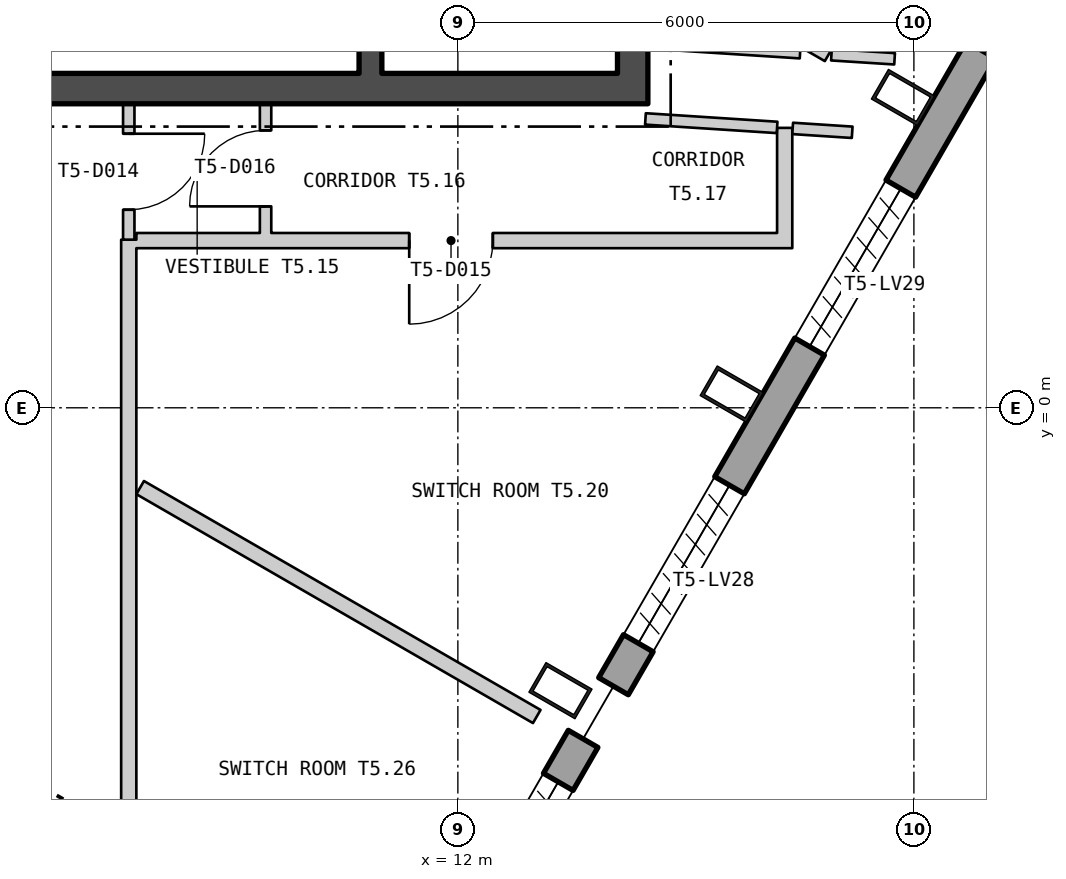
"""IFC4 building model, lengths in metres.
Left out: names, types, materials, properties, quantities, classifications, styles, units other than length and angle.
Written with IfcOpenShell. Run it as: python <this file> out.ifc"""

import sys

from ifc_helpers import new_model, si_unit, direction, frame, frame_2d, origin, origin_2d, place, context, subcontext, project, spatial, polyline, rectangle, hollow_rectangle, outline, extrude, element, fill, save


model = new_model("IFC4")
c1 = context("Model", 3, precision=1e-05, world=origin(), true_north=direction((0.0, 1.0)))
c2 = subcontext(c1, "Body", "Model", "MODEL_VIEW")
j1 = project(units=[si_unit("LENGTHUNIT", "METRE"), si_unit("PLANEANGLEUNIT", "RADIAN")], contexts=[c1])
p1 = place(None, origin())
s1 = spatial("IfcSite", under=j1, at=p1, CompositionType="ELEMENT")
p2 = place(p1, origin())
s2 = spatial("IfcBuilding", under=s1, at=p2, CompositionType="ELEMENT")
p3 = place(p2, frame((0.0, 0.0, 292.2)))
s3 = spatial("IfcBuildingStorey", under=s2, at=p3, CompositionType="ELEMENT", Elevation=292.2)
for number, where, z_axis, x_axis in (
    (1, (13.35, -3.722, 0.0), (0.0, 0.0, 1.0), (0.5, 0.866, 0.0)),
    (2, (15.603, 0.181, 0.0), (0.0, 0.0, 1.0), (0.5, 0.866, 0.0)),
    (3, (17.856, 4.083, 0.0), (0.0, 0.0, 1.0), (0.5, 0.866, 0.0)),
):
    element("IfcColumn", number, at=place(p3, frame(where, z_axis=z_axis, x_axis=x_axis)), inside=s3, PredefinedType="COLUMN", context=c2, shape_type="SweptSolid", body=[
        extrude(hollow_rectangle(XDim=0.45, YDim=0.7, WallThickness=0.04, at=origin_2d()), origin(), (0.0, 0.0, 1.0), 6.0),
    ])
p4 = place(p3, frame((11.794, -7.566, -0.18), z_axis=(0.0, 0.0, 1.0), x_axis=(0.50000114038, 0.866024745385, 0.0)))
e4 = element("IfcWall", 4, at=p4, inside=s3, PredefinedType="SOLIDWALL", context=c2, shape_type="SweptSolid", body=[
    extrude(outline(polyline([(0.0, -0.225), (3.707, -0.225), (3.707, 0.225), (0.0, 0.225), (0.0, -0.225)])), origin(), (0.0, 0.0, 1.0), 5.9),
])
p5 = place(p4, frame((0.653, 0.0, 1.38)))
e5 = element("IfcOpeningElement", 5, at=p5, cuts=e4, PredefinedType="OPENING", context=c2, shape_type="SweptSolid", body=[
    extrude(rectangle(XDim=2.4, YDim=3.6, at=frame_2d((1.2, 1.8))), frame((0.0, 0.235, 0.0), z_axis=(0.0, -1.0, 0.0), x_axis=(1.0, 0.0, 0.0)), (0.0, 0.0, 1.0), 0.47),
])
p6 = place(p3, frame((14.048, -3.663, -0.18), z_axis=(0.0, 0.0, 1.0), x_axis=(0.500002580931, 0.866023913678, 0.0)))
e6 = element("IfcWall", 6, at=p6, inside=s3, PredefinedType="SOLIDWALL", context=c2, shape_type="SweptSolid", body=[
    extrude(outline(polyline([(0.0, -0.225), (22.595, -0.225), (22.335, 0.225), (0.0, 0.225), (0.0, -0.225)])), origin(), (0.0, 0.0, 1.0), 5.9),
])
p7 = place(p6, frame((0.653, 0.0, 1.38)))
e7 = element("IfcOpeningElement", 7, at=p7, cuts=e6, PredefinedType="OPENING", context=c2, shape_type="SweptSolid", body=[
    extrude(rectangle(XDim=2.4, YDim=3.6, at=frame_2d((1.2, 1.8))), frame((0.0, 0.235, 0.0), z_axis=(0.0, -1.0, 0.0), x_axis=(1.0, 0.0, 0.0)), (0.0, 0.0, 1.0), 0.47),
])
p8 = place(p6, frame((5.16, 0.0, 1.38)))
e8 = element("IfcOpeningElement", 8, at=p8, cuts=e6, PredefinedType="OPENING", context=c2, shape_type="SweptSolid", body=[
    extrude(rectangle(XDim=2.4, YDim=3.6, at=frame_2d((1.2, 1.8))), frame((0.0, 0.235, 0.0), z_axis=(0.0, -1.0, 0.0), x_axis=(1.0, 0.0, 0.0)), (0.0, 0.0, 1.0), 0.47),
])
p9 = place(p6, frame((9.667, 0.0, 1.38)))
e9 = element("IfcOpeningElement", 9, at=p9, cuts=e6, PredefinedType="OPENING", context=c2, shape_type="SweptSolid", body=[
    extrude(rectangle(XDim=2.4, YDim=3.6, at=frame_2d((1.2, 1.8))), frame((0.0, 0.235, 0.0), z_axis=(0.0, -1.0, 0.0), x_axis=(1.0, 0.0, 0.0)), (0.0, 0.0, 1.0), 0.47),
])
p10 = place(p6, frame((14.173, 0.0, 1.38)))
e10 = element("IfcOpeningElement", 10, at=p10, cuts=e6, PredefinedType="OPENING", context=c2, shape_type="SweptSolid", body=[
    extrude(rectangle(XDim=2.4, YDim=3.6, at=frame_2d((1.2, 1.8))), frame((0.0, 0.235, 0.0), z_axis=(0.0, -1.0, 0.0), x_axis=(1.0, 0.0, 0.0)), (0.0, 0.0, 1.0), 0.47),
])
p11 = place(p6, frame((18.641, 0.0, 1.38)))
e11 = element("IfcOpeningElement", 11, at=p11, cuts=e6, PredefinedType="OPENING", context=c2, shape_type="SweptSolid", body=[
    extrude(rectangle(XDim=2.4, YDim=3.6, at=frame_2d((1.2, 1.8))), frame((0.0, 0.235, 0.0), z_axis=(0.0, -1.0, 0.0), x_axis=(1.0, 0.0, 0.0)), (0.0, 0.0, 1.0), 0.47),
])
p12 = place(p3, frame((-14.5, 4.2, 0.0), z_axis=(0.0, 0.0, 1.0), x_axis=(1.0, 0.0, 0.0)))
e12 = element("IfcWall", 12, at=p12, inside=s3, PredefinedType="SHEAR", context=c2, shape_type="SweptSolid", body=[
    extrude(rectangle(XDim=29.0, YDim=0.4, at=frame_2d((14.5, 0.0))), origin(), (0.0, 0.0, 1.0), 5.7),
])
p13 = place(p12, frame((9.0, 0.0, 0.0)))
e13 = element("IfcOpeningElement", 13, at=p13, cuts=e12, PredefinedType="OPENING", context=c2, shape_type="SweptSolid", body=[
    extrude(rectangle(XDim=1.8, YDim=2.4, at=frame_2d((0.9, 1.2))), frame((0.0, 0.21, 0.0), z_axis=(0.0, -1.0, 0.0), x_axis=(1.0, 0.0, 0.0)), (0.0, 0.0, 1.0), 0.42),
])
p14 = place(p12, frame((19.0, 0.0, 0.0)))
e14 = element("IfcOpeningElement", 14, at=p14, cuts=e12, PredefinedType="OPENING", context=c2, shape_type="SweptSolid", body=[
    extrude(rectangle(XDim=1.8, YDim=2.4, at=frame_2d((0.9, 1.2))), frame((0.0, 0.21, 0.0), z_axis=(0.0, -1.0, 0.0), x_axis=(1.0, 0.0, 0.0)), (0.0, 0.0, 1.0), 0.42),
])
p15 = place(p3, frame((14.3, 4.4, 0.0), z_axis=(0.0, 0.0, 1.0), x_axis=(0.0, 1.0, 0.0)))
e15 = element("IfcWall", 15, at=p15, inside=s3, PredefinedType="SHEAR", context=c2, shape_type="SweptSolid", body=[
    extrude(rectangle(XDim=13.2, YDim=0.4, at=frame_2d((6.6, 0.0))), origin(), (0.0, 0.0, 1.0), 5.7),
])
p16 = place(p15, frame((3.05, 0.0, 0.0)))
e16 = element("IfcOpeningElement", 16, at=p16, cuts=e15, PredefinedType="OPENING", context=c2, shape_type="SweptSolid", body=[
    extrude(rectangle(XDim=1.5, YDim=2.1, at=frame_2d((0.75, 1.05))), frame((0.0, 0.21, 0.0), z_axis=(0.0, -1.0, 0.0), x_axis=(1.0, 0.0, 0.0)), (0.0, 0.0, 1.0), 0.42),
])
p17 = place(p3, frame((10.85, 4.4, 0.0), z_axis=(0.0, 0.0, 1.0), x_axis=(0.0, 1.0, 0.0)))
e17 = element("IfcWall", 17, at=p17, inside=s3, PredefinedType="SHEAR", context=c2, shape_type="SweptSolid", body=[
    extrude(rectangle(XDim=13.2, YDim=0.3, at=frame_2d((6.6, 0.0))), origin(), (0.0, 0.0, 1.0), 5.7),
])
p18 = place(p17, frame((1.575, 0.0, 0.0)))
e18 = element("IfcOpeningElement", 18, at=p18, cuts=e17, PredefinedType="OPENING", context=c2, shape_type="SweptSolid", body=[
    extrude(rectangle(XDim=1.25, YDim=2.1, at=frame_2d((0.625, 1.05))), frame((0.0, 0.16, 0.0), z_axis=(0.0, -1.0, 0.0), x_axis=(1.0, 0.0, 0.0)), (0.0, 0.0, 1.0), 0.32),
])
p19 = place(p17, frame((0.4, 0.0, 0.0)))
e19 = element("IfcOpeningElement", 19, at=p19, cuts=e17, PredefinedType="OPENING", context=c2, shape_type="SweptSolid", body=[
    extrude(rectangle(XDim=0.9, YDim=2.1, at=frame_2d((0.45, 1.05))), frame((0.0, 0.16, 0.0), z_axis=(0.0, -1.0, 0.0), x_axis=(1.0, 0.0, 0.0)), (0.0, 0.0, 1.0), 0.32),
])
p20 = place(p3, frame((7.67, -13.7, 0.0), z_axis=(0.0, 0.0, 1.0), x_axis=(0.0, 1.0, 0.0)))
e20 = element("IfcWall", 20, at=p20, inside=s3, PredefinedType="PARTITIONING", context=c2, shape_type="SweptSolid", body=[
    extrude(rectangle(XDim=15.912, YDim=0.2, at=frame_2d((7.956, 0.0))), origin(), (0.0, 0.0, 1.0), 5.7),
])
p21 = place(p20, frame((5.342, 0.0, 0.0)))
e21 = element("IfcOpeningElement", 21, at=p21, cuts=e20, PredefinedType="OPENING", context=c2, shape_type="SweptSolid", body=[
    extrude(rectangle(XDim=1.1, YDim=2.1, at=frame_2d((0.55, 1.05))), frame((0.0, 0.11, 0.0), z_axis=(0.0, -1.0, 0.0), x_axis=(1.0, 0.0, 0.0)), (0.0, 0.0, 1.0), 0.22),
])
p22 = place(p3, frame((7.67, 2.212, 0.0), z_axis=(0.0, 0.0, 1.0), x_axis=(0.0, 1.0, 0.0)))
e22 = element("IfcWall", 22, at=p22, inside=s3, PredefinedType="PARTITIONING", context=c2, shape_type="SweptSolid", body=[
    extrude(rectangle(XDim=1.788, YDim=0.15, at=frame_2d((0.894, 0.0))), origin(), (0.0, 0.0, 1.0), 5.7),
])
p23 = place(p22, frame((0.394, 0.0, 0.0)))
e23 = element("IfcOpeningElement", 23, at=p23, cuts=e22, PredefinedType="OPENING", context=c2, shape_type="SweptSolid", body=[
    extrude(rectangle(XDim=1.0, YDim=2.1, at=frame_2d((0.5, 1.05))), frame((0.0, 0.085, 0.0), z_axis=(0.0, -1.0, 0.0), x_axis=(1.0, 0.0, 0.0)), (0.0, 0.0, 1.0), 0.17),
])
p24 = place(p3, frame((7.77, 2.2, 0.0), z_axis=(0.0, 0.0, 1.0), x_axis=(1.0, 0.0, 0.0)))
e24 = element("IfcWall", 24, at=p24, inside=s3, PredefinedType="PARTITIONING", context=c2, shape_type="SweptSolid", body=[
    extrude(rectangle(XDim=8.63, YDim=0.2, at=frame_2d((4.315, 0.0))), origin(), (0.0, 0.0, 1.0), 5.7),
])
p25 = place(p24, frame((3.59, 0.0, 0.0)))
e25 = element("IfcOpeningElement", 25, at=p25, cuts=e24, PredefinedType="OPENING", context=c2, shape_type="SweptSolid", body=[
    extrude(rectangle(XDim=1.1, YDim=2.1, at=frame_2d((0.55, 1.05))), frame((0.0, 0.11, 0.0), z_axis=(0.0, -1.0, 0.0), x_axis=(1.0, 0.0, 0.0)), (0.0, 0.0, 1.0), 0.22),
])
p26 = place(p3, frame((7.82, -1.05, 0.0), z_axis=(0.0, 0.0, 1.0), x_axis=(0.866069507536, -0.49992360228, 0.0)))
e26 = element("IfcWall", 26, at=p26, inside=s3, PredefinedType="PARTITIONING", context=c2, shape_type="SweptSolid", body=[
    extrude(rectangle(XDim=6.025, YDim=0.2, at=frame_2d((3.012, 0.0))), origin(), (0.0, 0.0, 1.0), 5.7),
])
p27 = place(p3, frame((9.47, 2.3, 0.0), z_axis=(0.0, 0.0, 1.0), x_axis=(0.0, 1.0, 0.0)))
e27 = element("IfcWall", 27, at=p27, inside=s3, PredefinedType="PARTITIONING", context=c2, shape_type="SweptSolid", body=[
    extrude(rectangle(XDim=1.7, YDim=0.15, at=frame_2d((0.85, 0.0))), origin(), (0.0, 0.0, 1.0), 5.25),
])
p28 = place(p27, frame((0.35, 0.0, 0.0)))
e28 = element("IfcOpeningElement", 28, at=p28, cuts=e27, PredefinedType="OPENING", context=c2, shape_type="SweptSolid", body=[
    extrude(rectangle(XDim=1.0, YDim=2.1, at=frame_2d((0.5, 1.05))), frame((0.0, 0.085, 0.0), z_axis=(0.0, -1.0, 0.0), x_axis=(1.0, 0.0, 0.0)), (0.0, 0.0, 1.0), 0.17),
])
p29 = place(p3, frame((14.468, 3.801, 0.0), z_axis=(0.0, 0.0, 1.0), x_axis=(0.997915745008, -0.064530348407, 0.0)))
e29 = element("IfcWall", 29, at=p29, inside=s3, PredefinedType="PARTITIONING", context=c2, shape_type="SweptSolid", body=[
    extrude(rectangle(XDim=1.736, YDim=0.15, at=frame_2d((0.868, 0.0))), origin(), (0.0, 0.0, 1.0), 5.7),
])
p30 = place(p3, frame((14.532, 4.799, 0.0), z_axis=(0.0, 0.0, 1.0), x_axis=(0.997930552357, -0.064300953906, 0.0)))
e30 = element("IfcWall", 30, at=p30, inside=s3, PredefinedType="PARTITIONING", context=c2, shape_type="SweptSolid", body=[
    extrude(rectangle(XDim=1.975, YDim=0.15, at=frame_2d((0.988, 0.0))), origin(), (0.0, 0.0, 1.0), 5.7),
])
p31 = place(p3, frame((16.3, 2.3, 0.0), z_axis=(0.0, 0.0, 1.0), x_axis=(0.0, 1.0, 0.0)))
e31 = element("IfcWall", 31, at=p31, inside=s3, PredefinedType="PARTITIONING", context=c2, shape_type="SweptSolid", body=[
    extrude(rectangle(XDim=1.383, YDim=0.2, at=frame_2d((0.692, 0.0))), origin(), (0.0, 0.0, 1.0), 5.7),
])
p32 = place(p3, frame((16.405, 3.676, 0.0), z_axis=(0.0, 0.0, 1.0), x_axis=(0.997885500156, -0.064996373573, 0.0)))
e32 = element("IfcWall", 32, at=p32, inside=s3, PredefinedType="PARTITIONING", context=c2, shape_type="SweptSolid", body=[
    extrude(rectangle(XDim=0.785, YDim=0.15, at=frame_2d((0.392, 0.0))), origin(), (0.0, 0.0, 1.0), 5.7),
])
p33 = place(p3, frame((16.418, 4.914, 0.0), z_axis=(0.0, 0.0, 1.0), x_axis=(0.865683861507, -0.500591102524, 0.0)))
e33 = element("IfcWall", 33, at=p33, inside=s3, PredefinedType="PARTITIONING", context=c2, shape_type="SweptSolid", body=[
    extrude(rectangle(XDim=0.531, YDim=0.2, at=frame_2d((0.266, 0.0))), origin(), (0.0, 0.0, 1.0), 5.7),
])
p34 = place(p3, frame((16.915, 4.645, 0.0), z_axis=(0.0, 0.0, 1.0), x_axis=(0.997972330248, -0.063649258127, 0.0)))
e34 = element("IfcWall", 34, at=p34, inside=s3, PredefinedType="PARTITIONING", context=c2, shape_type="SweptSolid", body=[
    extrude(rectangle(XDim=0.833, YDim=0.15, at=frame_2d((0.416, 0.0))), origin(), (0.0, 0.0, 1.0), 5.7),
])
p35 = place(p23, origin())
e35 = element("IfcDoor", 35, at=p35, inside=s3, OperationType="SINGLE_SWING_RIGHT", PredefinedType="DOOR", context=c2, shape_type="SweptSolid", body=[
    extrude(rectangle(XDim=1.0, YDim=2.1, at=frame_2d((0.5, 1.05))), frame((0.0, 0.025, 0.0), z_axis=(0.0, -1.0, 0.0), x_axis=(1.0, 0.0, 0.0)), (0.0, 0.0, 1.0), 0.05),
])
fill(e23, e35)
p36 = place(p25, origin())
e36 = element("IfcDoor", 36, at=p36, inside=s3, OperationType="SINGLE_SWING_LEFT", PredefinedType="DOOR", context=c2, shape_type="SweptSolid", body=[
    extrude(rectangle(XDim=1.1, YDim=2.1, at=frame_2d((0.55, 1.05))), frame((0.0, 0.025, 0.0), z_axis=(0.0, -1.0, 0.0), x_axis=(1.0, 0.0, 0.0)), (0.0, 0.0, 1.0), 0.05),
])
fill(e25, e36)
p37 = place(p28, origin())
e37 = element("IfcDoor", 37, at=p37, inside=s3, OperationType="SINGLE_SWING_RIGHT", PredefinedType="DOOR", context=c2, shape_type="SweptSolid", body=[
    extrude(rectangle(XDim=1.0, YDim=2.1, at=frame_2d((0.5, 1.05))), frame((0.0, 0.025, 0.0), z_axis=(0.0, -1.0, 0.0), x_axis=(1.0, 0.0, 0.0)), (0.0, 0.0, 1.0), 0.05),
])
fill(e28, e37)
save(model, sys.argv[1])
